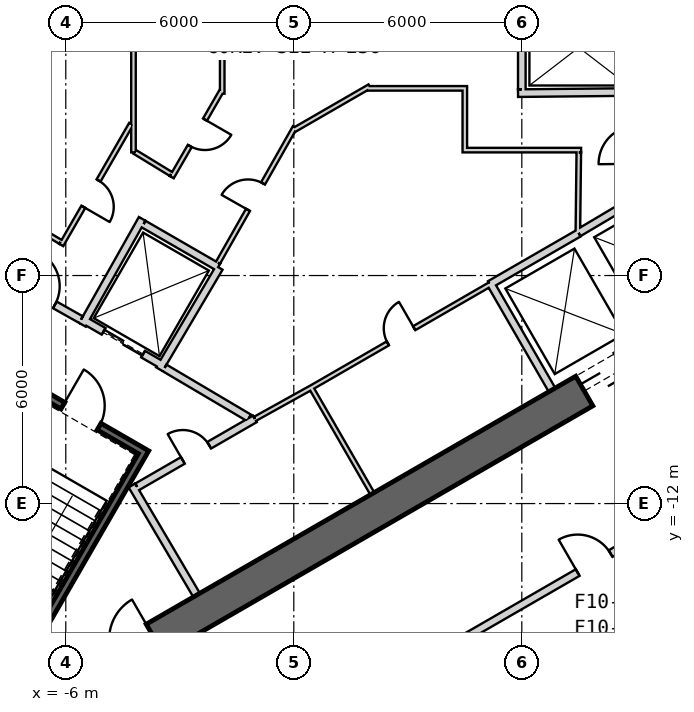
"""IFC4 building model, lengths in metres.
Left out: names, types, materials, properties, quantities, classifications, styles, units other than length and angle.
Written with IfcOpenShell. Run it as: python <this file> out.ifc"""

import sys

from ifc_helpers import new_model, si_unit, direction, frame, frame_2d, origin, place, context, subcontext, project, spatial, rectangle, extrude, element, fill, save


model = new_model("IFC4")
c1 = context("Model", 3, precision=1e-05, world=origin(), true_north=direction((0.0, 1.0)))
c2 = subcontext(c1, "Body", "Model", "MODEL_VIEW")
j1 = project(units=[si_unit("LENGTHUNIT", "METRE"), si_unit("PLANEANGLEUNIT", "RADIAN")], contexts=[c1])
p1 = place(None, origin())
s1 = spatial("IfcSite", under=j1, at=p1, CompositionType="ELEMENT")
p2 = place(p1, origin())
s2 = spatial("IfcBuilding", under=s1, at=p2, CompositionType="ELEMENT")
p3 = place(p2, frame((0.0, 0.0, 333.8)))
s3 = spatial("IfcBuildingStorey", under=s2, at=p3, CompositionType="ELEMENT", Elevation=333.8)
p4 = place(p3, frame((-7.825, -17.97, 0.0), z_axis=(0.0, 0.0, 1.0), x_axis=(0.866028369851, 0.499994862586, 0.0)))
e1 = element("IfcWall", 1, at=p4, inside=s3, PredefinedType="SHEAR", context=c2, shape_type="SweptSolid", body=[
    extrude(rectangle(XDim=31.523, YDim=0.9, at=frame_2d((15.762, 0.0))), origin(), (0.0, 0.0, 1.0), 3.9),
])
p5 = place(p4, frame((17.862, 0.0, 0.0)))
e2 = element("IfcOpeningElement", 2, at=p5, cuts=e1, PredefinedType="OPENING", context=c2, shape_type="SweptSolid", body=[
    extrude(rectangle(XDim=1.2, YDim=2.4, at=frame_2d((0.6, 1.2))), frame((0.0, 0.46, 0.0), z_axis=(0.0, -1.0, 0.0), x_axis=(1.0, 0.0, 0.0)), (0.0, 0.0, 1.0), 0.92),
])
p6 = place(p4, frame((20.562, 0.0, 0.0)))
e3 = element("IfcOpeningElement", 3, at=p6, cuts=e1, PredefinedType="OPENING", context=c2, shape_type="SweptSolid", body=[
    extrude(rectangle(XDim=1.2, YDim=2.4, at=frame_2d((0.6, 1.2))), frame((0.0, 0.46, 0.0), z_axis=(0.0, -1.0, 0.0), x_axis=(1.0, 0.0, 0.0)), (0.0, 0.0, 1.0), 0.92),
])
p7 = place(p4, frame((26.712, 0.0, 0.0)))
e4 = element("IfcOpeningElement", 4, at=p7, cuts=e1, PredefinedType="OPENING", context=c2, shape_type="SweptSolid", body=[
    extrude(rectangle(XDim=1.2, YDim=2.4, at=frame_2d((0.6, 1.2))), frame((0.0, 0.46, 0.0), z_axis=(0.0, -1.0, 0.0), x_axis=(1.0, 0.0, 0.0)), (0.0, 0.0, 1.0), 0.92),
])
p8 = place(p4, frame((3.612, 0.0, 0.0)))
e5 = element("IfcOpeningElement", 5, at=p8, cuts=e1, PredefinedType="OPENING", context=c2, shape_type="SweptSolid", body=[
    extrude(rectangle(XDim=1.2, YDim=2.4, at=frame_2d((0.6, 1.2))), frame((0.0, 0.46, 0.0), z_axis=(0.0, -1.0, 0.0), x_axis=(1.0, 0.0, 0.0)), (0.0, 0.0, 1.0), 0.92),
])
p9 = place(p3, frame((6.795, -9.01, 0.0), z_axis=(0.0, 0.0, 1.0), x_axis=(-0.499984717929, 0.866034226713, 0.0)))
e6 = element("IfcWall", 6, at=p9, inside=s3, PredefinedType="PLUMBINGWALL", context=c2, shape_type="SweptSolid", body=[
    extrude(rectangle(XDim=3.25, YDim=0.2, at=frame_2d((1.625, 0.0))), origin(), (0.0, 0.0, 1.0), 3.6),
])
p10 = place(p3, frame((5.159, -6.236, 0.0), z_axis=(0.0, 0.0, 1.0), x_axis=(0.866036505625, 0.499980770555, 0.0)))
e7 = element("IfcWall", 7, at=p10, inside=s3, PredefinedType="PLUMBINGWALL", context=c2, shape_type="SweptSolid", body=[
    extrude(rectangle(XDim=2.7, YDim=0.2, at=frame_2d((1.35, 0.0))), origin(), (0.0, 0.0, 1.0), 3.6),
])
p11 = place(p3, frame((7.493, -4.878, 0.0), z_axis=(0.0, 0.0, 1.0), x_axis=(0.859981807212, 0.510324691999, 0.0)))
e8 = element("IfcWall", 8, at=p11, inside=s3, PredefinedType="PLUMBINGWALL", context=c2, shape_type="SweptSolid", body=[
    extrude(rectangle(XDim=1.845, YDim=0.2, at=frame_2d((0.922, 0.0))), origin(), (0.0, 0.0, 1.0), 3.6),
])
p12 = place(p3, frame((5.9, -1.201, 0.0), z_axis=(0.0, 0.0, 1.0), x_axis=(0.999950064753, 0.009993397809, 0.0)))
e9 = element("IfcWall", 9, at=p12, inside=s3, PredefinedType="PLUMBINGWALL", context=c2, shape_type="SweptSolid", body=[
    extrude(rectangle(XDim=3.2, YDim=0.2, at=frame_2d((1.6, 0.0))), origin(), (0.0, 0.0, 1.0), 3.6),
])
p13 = place(p3, frame((6.0, -1.1, 0.0), z_axis=(0.0, 0.0, 1.0), x_axis=(0.0, 1.0, 0.0)))
e10 = element("IfcWall", 10, at=p13, inside=s3, PredefinedType="PLUMBINGWALL", context=c2, shape_type="SweptSolid", body=[
    extrude(rectangle(XDim=2.28, YDim=0.2, at=frame_2d((1.14, 0.0))), origin(), (0.0, 0.0, 1.0), 3.6),
])
p14 = place(p3, frame((-3.905, -10.563, -0.3), z_axis=(0.0, 0.0, 1.0), x_axis=(-0.500012932018, -0.866017937352, 0.0)))
e11 = element("IfcWall", 11, at=p14, inside=s3, PredefinedType="SHEAR", context=c2, shape_type="SweptSolid", body=[
    extrude(rectangle(XDim=8.1, YDim=0.2, at=frame_2d((4.05, 0.0))), origin(), (0.0, 0.0, 1.0), 3.9),
])
p15 = place(p3, frame((-4.041, -10.599, -0.3), z_axis=(0.0, 0.0, 1.0), x_axis=(-0.866047807691, 0.499961193289, 0.0)))
e12 = element("IfcWall", 12, at=p15, inside=s3, PredefinedType="SHEAR", context=c2, shape_type="SweptSolid", body=[
    extrude(rectangle(XDim=3.6, YDim=0.2, at=frame_2d((1.8, 0.0))), origin(), (0.0, 0.0, 1.0), 3.9),
])
p16 = place(p15, frame((1.25, 0.0, 0.3)))
e13 = element("IfcOpeningElement", 13, at=p16, cuts=e12, PredefinedType="OPENING", context=c2, shape_type="SweptSolid", body=[
    extrude(rectangle(XDim=1.1, YDim=2.1, at=frame_2d((0.55, 1.05))), frame((0.0, 0.11, 0.0), z_axis=(0.0, -1.0, 0.0), x_axis=(1.0, 0.0, 0.0)), (0.0, 0.0, 1.0), 0.22),
])
p17 = place(p3, frame((-3.446, -8.368, 0.0), z_axis=(0.0, 0.0, 1.0), x_axis=(-0.866024647952, 0.500001309137, 0.0)))
e14 = element("IfcWall", 14, at=p17, inside=s3, PredefinedType="PLUMBINGWALL", context=c2, shape_type="SweptSolid", body=[
    extrude(rectangle(XDim=2.4, YDim=0.2, at=frame_2d((1.2, 0.0))), origin(), (0.0, 0.0, 1.0), 3.6),
])
p18 = place(p17, frame((0.6, 0.0, 0.0)))
e15 = element("IfcOpeningElement", 15, at=p18, cuts=e14, PredefinedType="OPENING", context=c2, shape_type="SweptSolid", body=[
    extrude(rectangle(XDim=1.2, YDim=2.4, at=frame_2d((0.6, 1.2))), frame((0.0, 0.11, 0.0), z_axis=(0.0, -1.0, 0.0), x_axis=(1.0, 0.0, 0.0)), (0.0, 0.0, 1.0), 0.22),
])
p19 = place(p3, frame((-1.961, -5.796, 0.0), z_axis=(0.0, 0.0, 1.0), x_axis=(-0.508647062354, -0.860975125052, 0.0)))
e16 = element("IfcWall", 16, at=p19, inside=s3, PredefinedType="PLUMBINGWALL", context=c2, shape_type="SweptSolid", body=[
    extrude(rectangle(XDim=3.1, YDim=0.2, at=frame_2d((1.55, 0.0))), origin(), (0.0, 0.0, 1.0), 3.6),
])
p20 = place(p3, frame((-3.99, -4.509, 0.0), z_axis=(0.0, 0.0, 1.0), x_axis=(-0.491358283181, -0.870957540612, 0.0)))
e17 = element("IfcWall", 17, at=p20, inside=s3, PredefinedType="PLUMBINGWALL", context=c2, shape_type="SweptSolid", body=[
    extrude(rectangle(XDim=3.2, YDim=0.2, at=frame_2d((1.6, 0.0))), origin(), (0.0, 0.0, 1.0), 3.6),
])
p21 = place(p3, frame((-3.953, -4.646, 0.0), z_axis=(0.0, 0.0, 1.0), x_axis=(0.866065302921, -0.4999308863, 0.0)))
e18 = element("IfcWall", 18, at=p21, inside=s3, PredefinedType="PLUMBINGWALL", context=c2, shape_type="SweptSolid", body=[
    extrude(rectangle(XDim=2.264, YDim=0.2, at=frame_2d((1.132, 0.0))), origin(), (0.0, 0.0, 1.0), 3.6),
])
p22 = place(p3, frame((2.067, -11.74, 0.0), z_axis=(0.0, 0.0, 1.0), x_axis=(-0.499984717929, 0.866034226713, 0.0)))
e19 = element("IfcWall", 19, at=p22, inside=s3, PredefinedType="PARTITIONING", context=c2, shape_type="SweptSolid", body=[
    extrude(rectangle(XDim=3.25, YDim=0.12, at=frame_2d((1.625, 0.0))), origin(), (0.0, 0.0, 1.0), 3.6),
])
p23 = place(p3, frame((-4.26, -11.524, 0.0), z_axis=(0.0, 0.0, 1.0), x_axis=(0.507997497166, -0.861358544901, 0.0)))
e20 = element("IfcWall", 20, at=p23, inside=s3, PredefinedType="PARTITIONING", context=c2, shape_type="SweptSolid", body=[
    extrude(rectangle(XDim=3.35, YDim=0.2, at=frame_2d((1.675, 0.0))), origin(), (0.0, 0.0, 1.0), 3.6),
])
p24 = place(p3, frame((-1.024, -9.771, 0.0), z_axis=(0.0, 0.0, 1.0), x_axis=(-0.866029903013, -0.499992207027, 0.0)))
e21 = element("IfcWall", 21, at=p24, inside=s3, PredefinedType="PARTITIONING", context=c2, shape_type="SweptSolid", body=[
    extrude(rectangle(XDim=3.578, YDim=0.2, at=frame_2d((1.789, 0.0))), origin(), (0.0, 0.0, 1.0), 3.6),
])
p25 = place(p24, frame((1.389, 0.0, 0.0)))
e22 = element("IfcOpeningElement", 22, at=p25, cuts=e21, PredefinedType="OPENING", context=c2, shape_type="SweptSolid", body=[
    extrude(rectangle(XDim=0.8, YDim=2.1, at=frame_2d((0.4, 1.05))), frame((0.0, 0.11, 0.0), z_axis=(0.0, -1.0, 0.0), x_axis=(1.0, 0.0, 0.0)), (0.0, 0.0, 1.0), 0.22),
])
p26 = place(p3, frame((-1.023, -9.772, 0.0), z_axis=(0.0, 0.0, 1.0), x_axis=(0.874290944206, 0.485402250592, 0.0)))
e23 = element("IfcWall", 23, at=p26, inside=s3, PredefinedType="PARTITIONING", context=c2, shape_type="SweptSolid", body=[
    extrude(rectangle(XDim=1.723, YDim=0.12, at=frame_2d((0.861, 0.0))), origin(), (0.0, 0.0, 1.0), 3.6),
])
p27 = place(p3, frame((0.483, -8.936, 0.0), z_axis=(0.0, 0.0, 1.0), x_axis=(0.866028230842, 0.499995103361, 0.0)))
e24 = element("IfcWall", 24, at=p27, inside=s3, PredefinedType="PARTITIONING", context=c2, shape_type="SweptSolid", body=[
    extrude(rectangle(XDim=5.4, YDim=0.12, at=frame_2d((2.7, 0.0))), origin(), (0.0, 0.0, 1.0), 3.6),
])
p28 = place(p27, frame((2.3, 0.0, 0.0)))
e25 = element("IfcOpeningElement", 25, at=p28, cuts=e24, PredefinedType="OPENING", context=c2, shape_type="SweptSolid", body=[
    extrude(rectangle(XDim=0.8, YDim=2.1, at=frame_2d((0.4, 1.05))), frame((0.0, 0.07, 0.0), z_axis=(0.0, -1.0, 0.0), x_axis=(1.0, 0.0, 0.0)), (0.0, 0.0, 1.0), 0.14),
])
p29 = place(p3, frame((-3.401, -8.43, 0.0), z_axis=(0.0, 0.0, 1.0), x_axis=(0.860630814782, -0.509229418482, 0.0)))
e26 = element("IfcWall", 26, at=p29, inside=s3, PredefinedType="PARTITIONING", context=c2, shape_type="SweptSolid", body=[
    extrude(rectangle(XDim=2.582, YDim=0.2, at=frame_2d((1.291, 0.0))), origin(), (0.0, 0.0, 1.0), 3.6),
])
p30 = place(p3, frame((-7.849, -5.894, 0.0), z_axis=(0.0, 0.0, 1.0), x_axis=(0.871363259478, -0.490638431059, 0.0)))
e27 = element("IfcWall", 27, at=p30, inside=s3, PredefinedType="PARTITIONING", context=c2, shape_type="SweptSolid", body=[
    extrude(rectangle(XDim=2.581, YDim=0.2, at=frame_2d((1.291, 0.0))), origin(), (0.0, 0.0, 1.0), 3.6),
])
p31 = place(p30, frame((0.791, 0.0, 0.0)))
e28 = element("IfcOpeningElement", 28, at=p31, cuts=e27, PredefinedType="OPENING", context=c2, shape_type="SweptSolid", body=[
    extrude(rectangle(XDim=1.0, YDim=2.1, at=frame_2d((0.5, 1.05))), frame((0.0, 0.11, 0.0), z_axis=(0.0, -1.0, 0.0), x_axis=(1.0, 0.0, 0.0)), (0.0, 0.0, 1.0), 0.22),
])
p32 = place(p3, frame((0.029, -2.099, 0.0), z_axis=(0.0, 0.0, 1.0), x_axis=(-0.49376265119, -0.869596713592, 0.0)))
e29 = element("IfcWall", 29, at=p32, inside=s3, PredefinedType="PARTITIONING", context=c2, shape_type="SweptSolid", body=[
    extrude(rectangle(XDim=4.097, YDim=0.12, at=frame_2d((2.048, 0.0))), origin(), (0.0, 0.0, 1.0), 3.6),
])
p33 = place(p32, frame((1.7, 0.0, 0.0)))
e30 = element("IfcOpeningElement", 30, at=p33, cuts=e29, PredefinedType="OPENING", context=c2, shape_type="SweptSolid", body=[
    extrude(rectangle(XDim=0.8, YDim=2.1, at=frame_2d((0.4, 1.05))), frame((0.0, 0.07, 0.0), z_axis=(0.0, -1.0, 0.0), x_axis=(1.0, 0.0, 0.0)), (0.0, 0.0, 1.0), 0.14),
])
p34 = place(p3, frame((1.995, -1.023, 0.0), z_axis=(0.0, 0.0, 1.0), x_axis=(-0.866043041921, -0.499969448606, 0.0)))
e31 = element("IfcWall", 31, at=p34, inside=s3, PredefinedType="PARTITIONING", context=c2, shape_type="SweptSolid", body=[
    extrude(rectangle(XDim=2.31, YDim=0.12, at=frame_2d((1.155, 0.0))), origin(), (0.0, 0.0, 1.0), 3.6),
])
p35 = place(p3, frame((4.56, -1.075, 0.0), z_axis=(0.0, 0.0, 1.0), x_axis=(-1.0, 0.0, 0.0)))
e32 = element("IfcWall", 32, at=p35, inside=s3, PredefinedType="PARTITIONING", context=c2, shape_type="SweptSolid", body=[
    extrude(rectangle(XDim=2.636, YDim=0.12, at=frame_2d((1.318, 0.0))), origin(), (0.0, 0.0, 1.0), 3.6),
])
p36 = place(p3, frame((4.5, -2.76, 0.0), z_axis=(0.0, 0.0, 1.0), x_axis=(0.0, 1.0, 0.0)))
e33 = element("IfcWall", 33, at=p36, inside=s3, PredefinedType="PARTITIONING", context=c2, shape_type="SweptSolid", body=[
    extrude(rectangle(XDim=1.625, YDim=0.12, at=frame_2d((0.812, 0.0))), origin(), (0.0, 0.0, 1.0), 3.6),
])
p37 = place(p3, frame((7.56, -2.7, 0.0), z_axis=(0.0, 0.0, 1.0), x_axis=(-1.0, 0.0, 0.0)))
e34 = element("IfcWall", 34, at=p37, inside=s3, PredefinedType="PARTITIONING", context=c2, shape_type="SweptSolid", body=[
    extrude(rectangle(XDim=3.0, YDim=0.12, at=frame_2d((1.5, 0.0))), origin(), (0.0, 0.0, 1.0), 3.6),
])
p38 = place(p3, frame((7.475, -4.865, 0.0), z_axis=(0.0, 0.0, 1.0), x_axis=(0.011716133148, 0.999931363757, 0.0)))
e35 = element("IfcWall", 35, at=p38, inside=s3, PredefinedType="PARTITIONING", context=c2, shape_type="SweptSolid", body=[
    extrude(rectangle(XDim=2.105, YDim=0.12, at=frame_2d((1.052, 0.0))), origin(), (0.0, 0.0, 1.0), 3.6),
])
p39 = place(p3, frame((-4.219, -2.76, 0.0), z_axis=(0.0, 0.0, 1.0), x_axis=(0.0, 1.0, 0.0)))
e36 = element("IfcWall", 36, at=p39, inside=s3, PredefinedType="PARTITIONING", context=c2, shape_type="SweptSolid", body=[
    extrude(rectangle(XDim=5.521, YDim=0.12, at=frame_2d((2.76, 0.0))), origin(), (0.0, 0.0, 1.0), 3.6),
])
p40 = place(p3, frame((-6.118, -5.197, 0.0), z_axis=(0.0, 0.0, 1.0), x_axis=(0.499979045085, 0.866037501772, 0.0)))
e37 = element("IfcWall", 37, at=p40, inside=s3, PredefinedType="PARTITIONING", context=c2, shape_type="SweptSolid", body=[
    extrude(rectangle(XDim=3.679, YDim=0.12, at=frame_2d((1.839, 0.0))), origin(), (0.0, 0.0, 1.0), 3.6),
])
p41 = place(p40, frame((1.16, 0.0, 0.0)))
e38 = element("IfcOpeningElement", 38, at=p41, cuts=e37, PredefinedType="OPENING", context=c2, shape_type="SweptSolid", body=[
    extrude(rectangle(XDim=0.8, YDim=2.1, at=frame_2d((0.4, 1.05))), frame((0.0, 0.07, 0.0), z_axis=(0.0, -1.0, 0.0), x_axis=(1.0, 0.0, 0.0)), (0.0, 0.0, 1.0), 0.14),
])
p42 = place(p3, frame((-7.95, -4.041, 0.0), z_axis=(0.0, 0.0, 1.0), x_axis=(0.860112457103, -0.510104461004, 0.0)))
e39 = element("IfcWall", 39, at=p42, inside=s3, PredefinedType="PARTITIONING", context=c2, shape_type="SweptSolid", body=[
    extrude(rectangle(XDim=2.104, YDim=0.12, at=frame_2d((1.052, 0.0))), origin(), (0.0, 0.0, 1.0), 3.6),
])
p43 = place(p3, frame((-1.884, -1.216, 0.0), z_axis=(0.0, 0.0, 1.0), x_axis=(0.0, 1.0, 0.0)))
e40 = element("IfcWall", 40, at=p43, inside=s3, PredefinedType="PARTITIONING", context=c2, shape_type="SweptSolid", body=[
    extrude(rectangle(XDim=2.31, YDim=0.12, at=frame_2d((1.155, 0.0))), origin(), (0.0, 0.0, 1.0), 3.6),
])
p44 = place(p3, frame((-3.211, -3.412, 0.0), z_axis=(0.0, 0.0, 1.0), x_axis=(0.500013727357, 0.866017478146, 0.0)))
e41 = element("IfcWall", 41, at=p44, inside=s3, PredefinedType="PARTITIONING", context=c2, shape_type="SweptSolid", body=[
    extrude(rectangle(XDim=2.636, YDim=0.12, at=frame_2d((1.318, 0.0))), origin(), (0.0, 0.0, 1.0), 3.6),
])
p45 = place(p44, frame((0.948, 0.0, 0.0)))
e42 = element("IfcOpeningElement", 42, at=p45, cuts=e41, PredefinedType="OPENING", context=c2, shape_type="SweptSolid", body=[
    extrude(rectangle(XDim=0.8, YDim=2.1, at=frame_2d((0.4, 1.05))), frame((0.0, 0.07, 0.0), z_axis=(0.0, -1.0, 0.0), x_axis=(1.0, 0.0, 0.0)), (0.0, 0.0, 1.0), 0.14),
])
p46 = place(p3, frame((-4.189, -2.744, 0.0), z_axis=(0.0, 0.0, 1.0), x_axis=(0.853217230587, -0.521555708845, 0.0)))
e43 = element("IfcWall", 43, at=p46, inside=s3, PredefinedType="PARTITIONING", context=c2, shape_type="SweptSolid", body=[
    extrude(rectangle(XDim=1.121, YDim=0.12, at=frame_2d((0.561, 0.0))), origin(), (0.0, 0.0, 1.0), 3.6),
])
p47 = place(p3, frame((-6.505, -21.885, 0.0), z_axis=(0.0, 0.0, 1.0), x_axis=(0.86602457258, 0.500001439686, 0.0)))
e44 = element("IfcWall", 44, at=p47, inside=s3, PredefinedType="PARTITIONING", context=c2, shape_type="SweptSolid", body=[
    extrude(rectangle(XDim=32.952, YDim=0.2, at=frame_2d((16.476, 0.0))), origin(), (0.0, 0.0, 1.0), 2.97),
])
p48 = place(p47, frame((28.061, 0.0, 0.0)))
e45 = element("IfcOpeningElement", 45, at=p48, cuts=e44, PredefinedType="OPENING", context=c2, shape_type="SweptSolid", body=[
    extrude(rectangle(XDim=1.0, YDim=2.1, at=frame_2d((0.5, 1.05))), frame((0.0, 0.11, 0.0), z_axis=(0.0, -1.0, 0.0), x_axis=(1.0, 0.0, 0.0)), (0.0, 0.0, 1.0), 0.22),
])
p49 = place(p47, frame((16.137, 0.0, 0.0)))
e46 = element("IfcOpeningElement", 46, at=p49, cuts=e44, PredefinedType="OPENING", context=c2, shape_type="SweptSolid", body=[
    extrude(rectangle(XDim=1.0, YDim=2.1, at=frame_2d((0.5, 1.05))), frame((0.0, 0.11, 0.0), z_axis=(0.0, -1.0, 0.0), x_axis=(1.0, 0.0, 0.0)), (0.0, 0.0, 1.0), 0.22),
])
p50 = place(p47, frame((4.101, 0.0, 0.0)))
e47 = element("IfcOpeningElement", 47, at=p50, cuts=e44, PredefinedType="OPENING", context=c2, shape_type="SweptSolid", body=[
    extrude(rectangle(XDim=1.0, YDim=2.1, at=frame_2d((0.5, 1.05))), frame((0.0, 0.11, 0.0), z_axis=(0.0, -1.0, 0.0), x_axis=(1.0, 0.0, 0.0)), (0.0, 0.0, 1.0), 0.22),
])
p51 = place(p16, origin())
e48 = element("IfcDoor", 48, at=p51, inside=s3, OperationType="SINGLE_SWING_RIGHT", PredefinedType="USERDEFINED", context=c2, shape_type="SweptSolid", body=[
    extrude(rectangle(XDim=1.1, YDim=2.1, at=frame_2d((0.55, 1.05))), frame((0.0, 0.025, 0.0), z_axis=(0.0, -1.0, 0.0), x_axis=(1.0, 0.0, 0.0)), (0.0, 0.0, 1.0), 0.05),
])
fill(e13, e48)
p52 = place(p31, origin())
e49 = element("IfcDoor", 49, at=p52, inside=s3, OperationType="SINGLE_SWING_RIGHT", PredefinedType="USERDEFINED", context=c2, shape_type="SweptSolid", body=[
    extrude(rectangle(XDim=1.0, YDim=2.1, at=frame_2d((0.5, 1.05))), frame((0.0, 0.025, 0.0), z_axis=(0.0, -1.0, 0.0), x_axis=(1.0, 0.0, 0.0)), (0.0, 0.0, 1.0), 0.05),
])
fill(e28, e49)
p53 = place(p18, origin())
e50 = element("IfcDoor", 50, at=p53, inside=s3, OperationType="SLIDING_TO_LEFT", PredefinedType="USERDEFINED", context=c2, shape_type="SweptSolid", body=[
    extrude(rectangle(XDim=1.2, YDim=2.4, at=frame_2d((0.6, 1.2))), frame((0.0, 0.025, 0.0), z_axis=(0.0, -1.0, 0.0), x_axis=(1.0, 0.0, 0.0)), (0.0, 0.0, 1.0), 0.05),
])
fill(e15, e50)
p54 = place(p33, origin())
e51 = element("IfcDoor", 51, at=p54, inside=s3, OperationType="SINGLE_SWING_LEFT", PredefinedType="USERDEFINED", context=c2, shape_type="SweptSolid", body=[
    extrude(rectangle(XDim=0.8, YDim=2.1, at=frame_2d((0.4, 1.05))), frame((0.0, 0.025, 0.0), z_axis=(0.0, -1.0, 0.0), x_axis=(1.0, 0.0, 0.0)), (0.0, 0.0, 1.0), 0.05),
])
fill(e30, e51)
p55 = place(p41, origin())
e52 = element("IfcDoor", 52, at=p55, inside=s3, OperationType="SINGLE_SWING_RIGHT", PredefinedType="USERDEFINED", context=c2, shape_type="SweptSolid", body=[
    extrude(rectangle(XDim=0.8, YDim=2.1, at=frame_2d((0.4, 1.05))), frame((0.0, 0.025, 0.0), z_axis=(0.0, -1.0, 0.0), x_axis=(1.0, 0.0, 0.0)), (0.0, 0.0, 1.0), 0.05),
])
fill(e38, e52)
p56 = place(p45, origin())
e53 = element("IfcDoor", 53, at=p56, inside=s3, OperationType="SINGLE_SWING_RIGHT", PredefinedType="USERDEFINED", context=c2, shape_type="SweptSolid", body=[
    extrude(rectangle(XDim=0.8, YDim=2.1, at=frame_2d((0.4, 1.05))), frame((0.0, 0.025, 0.0), z_axis=(0.0, -1.0, 0.0), x_axis=(1.0, 0.0, 0.0)), (0.0, 0.0, 1.0), 0.05),
])
fill(e42, e53)
p57 = place(p25, origin())
e54 = element("IfcDoor", 54, at=p57, inside=s3, OperationType="SINGLE_SWING_RIGHT", PredefinedType="USERDEFINED", context=c2, shape_type="SweptSolid", body=[
    extrude(rectangle(XDim=0.8, YDim=2.1, at=frame_2d((0.4, 1.05))), frame((0.0, 0.025, 0.0), z_axis=(0.0, -1.0, 0.0), x_axis=(1.0, 0.0, 0.0)), (0.0, 0.0, 1.0), 0.05),
])
fill(e22, e54)
p58 = place(p28, origin())
e55 = element("IfcDoor", 55, at=p58, inside=s3, OperationType="SINGLE_SWING_RIGHT", PredefinedType="USERDEFINED", context=c2, shape_type="SweptSolid", body=[
    extrude(rectangle(XDim=0.8, YDim=2.1, at=frame_2d((0.4, 1.05))), frame((0.0, 0.025, 0.0), z_axis=(0.0, -1.0, 0.0), x_axis=(1.0, 0.0, 0.0)), (0.0, 0.0, 1.0), 0.05),
])
fill(e25, e55)
p59 = place(p49, origin())
e56 = element("IfcDoor", 56, at=p59, inside=s3, OperationType="SINGLE_SWING_RIGHT", PredefinedType="USERDEFINED", context=c2, shape_type="SweptSolid", body=[
    extrude(rectangle(XDim=1.0, YDim=2.1, at=frame_2d((0.5, 1.05))), frame((0.0, 0.025, 0.0), z_axis=(0.0, -1.0, 0.0), x_axis=(1.0, 0.0, 0.0)), (0.0, 0.0, 1.0), 0.05),
])
fill(e46, e56)
p60 = place(p5, origin())
e57 = element("IfcDoor", 57, at=p60, inside=s3, OperationType="SLIDING_TO_LEFT", PredefinedType="USERDEFINED", context=c2, shape_type="SweptSolid", body=[
    extrude(rectangle(XDim=1.2, YDim=2.4, at=frame_2d((0.6, 1.2))), frame((0.0, 0.025, 0.0), z_axis=(0.0, -1.0, 0.0), x_axis=(1.0, 0.0, 0.0)), (0.0, 0.0, 1.0), 0.05),
])
fill(e2, e57)
save(model, sys.argv[1])
